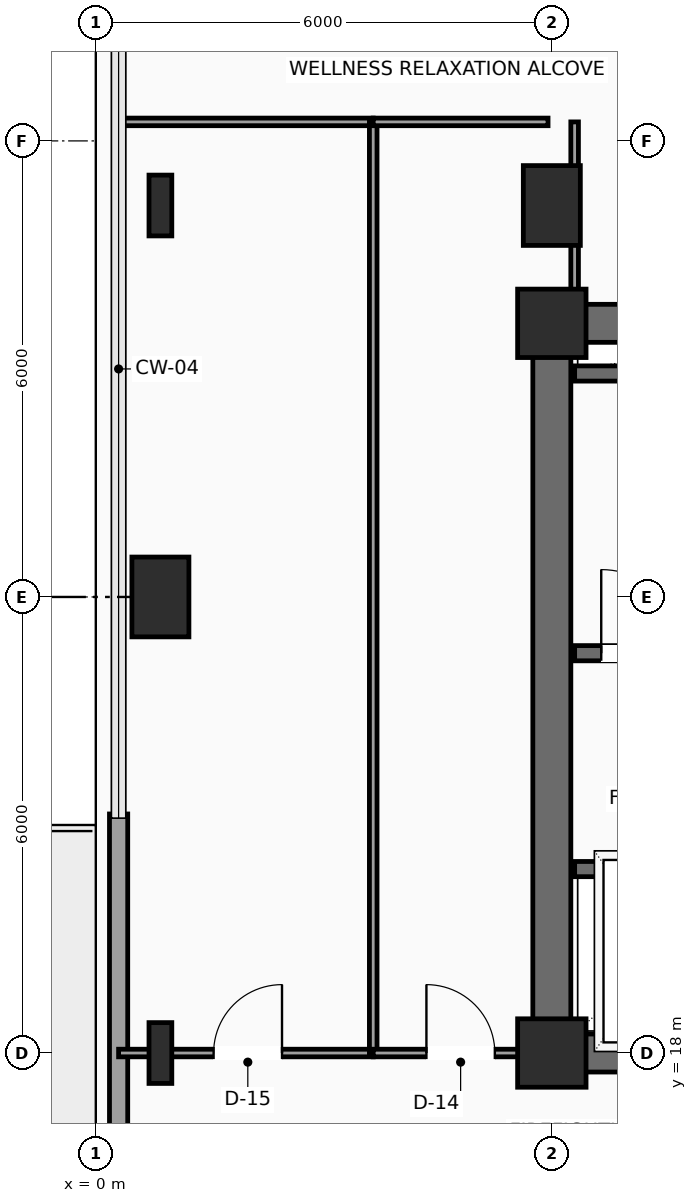
"""IFC4 building model, lengths in metres.
Left out: names, types, materials, properties, quantities, classifications, styles, units other than length and angle.
Written with IfcOpenShell. Run it as: python <this file> out.ifc"""

import sys

from ifc_helpers import new_model, si_unit, direction, frame, frame_2d, origin, origin_2d, place, context, subcontext, project, spatial, rectangle, i_section, extrude, element, fill, save


model = new_model("IFC4")
c1 = context("Model", 3, precision=1e-05, world=origin(), true_north=direction((0.0, 1.0)))
c2 = subcontext(c1, "Body", "Model", "MODEL_VIEW")
j1 = project(units=[si_unit("LENGTHUNIT", "METRE"), si_unit("PLANEANGLEUNIT", "RADIAN")], contexts=[c1])
p1 = place(None, origin())
s1 = spatial("IfcSite", under=j1, at=p1, CompositionType="ELEMENT")
p2 = place(p1, origin())
s2 = spatial("IfcBuilding", under=s1, at=p2, CompositionType="ELEMENT")
p3 = place(p2, frame((0.0, 0.0, 191.7)))
s3 = spatial("IfcBuildingStorey", under=s2, at=p3, CompositionType="ELEMENT", Elevation=191.7)
for number, where, z_axis, x_axis in (
    (1, (6.0, 18.0, 0.0), (0.0, 0.0, 1.0), (1.0, 0.0, 0.0)),
    (2, (6.0, 27.6, 0.0), (0.0, 0.0, 1.0), (1.0, 0.0, 0.0)),
):
    element("IfcColumn", number, at=place(p3, frame(where, z_axis=z_axis, x_axis=x_axis)), inside=s3, PredefinedType="COLUMN", context=c2, shape_type="SweptSolid", body=[
        extrude(rectangle(XDim=0.9, YDim=0.9, at=origin_2d()), origin(), (0.0, 0.0, 1.0), 3.75),
    ])
p4 = place(p3, frame((0.85, 18.0, 0.0), z_axis=(0.0, 0.0, 1.0), x_axis=(1.0, 0.0, 0.0)))
e3 = element("IfcColumn", 3, at=p4, inside=s3, PredefinedType="COLUMN", context=c2, shape_type="SweptSolid", body=[
    extrude(i_section(OverallWidth=0.3, OverallDepth=0.8, WebThickness=0.018, FlangeThickness=0.033, FilletRadius=0.03, at=origin_2d()), origin(), (0.0, 0.0, 1.0), 3.75),
])
p5 = place(p3, frame((0.85, 24.0, 0.0), z_axis=(0.0, 0.0, 1.0), x_axis=(1.0, 0.0, 0.0)))
e4 = element("IfcColumn", 4, at=p5, inside=s3, PredefinedType="COLUMN", context=c2, shape_type="SweptSolid", body=[
    extrude(rectangle(XDim=0.75, YDim=1.05, at=origin_2d()), origin(), (0.0, 0.0, 1.0), 3.75),
])
p6 = place(p3, frame((0.85, 29.15, 0.0), z_axis=(0.0, 0.0, 1.0), x_axis=(1.0, 0.0, 0.0)))
e5 = element("IfcColumn", 5, at=p6, inside=s3, PredefinedType="COLUMN", context=c2, shape_type="SweptSolid", body=[
    extrude(i_section(OverallWidth=0.3, OverallDepth=0.8, WebThickness=0.018, FlangeThickness=0.033, FilletRadius=0.03, at=origin_2d()), origin(), (0.0, 0.0, 1.0), 3.75),
])
p7 = place(p3, frame((6.0, 29.15, 0.0), z_axis=(0.0, 0.0, 1.0), x_axis=(1.0, 0.0, 0.0)))
e6 = element("IfcColumn", 6, at=p7, inside=s3, PredefinedType="COLUMN", context=c2, shape_type="SweptSolid", body=[
    extrude(rectangle(XDim=0.75, YDim=1.05, at=origin_2d()), origin(), (0.0, 0.0, 1.0), 3.75),
])
p8 = place(p3, frame((0.3, 11.855, 0.0), z_axis=(0.0, 0.0, 1.0), x_axis=(0.0, 1.0, 0.0)))
e7 = element("IfcWall", 7, at=p8, inside=s3, PredefinedType="SOLIDWALL", context=c2, shape_type="SweptSolid", body=[
    extrude(rectangle(XDim=9.29, YDim=0.24, at=frame_2d((4.645, 0.0))), origin(), (0.0, 0.0, 1.0), 3.54),
])
p9 = place(p8, frame((2.7, 0.0, 0.0)))
e8 = element("IfcOpeningElement", 8, at=p9, cuts=e7, PredefinedType="OPENING", context=c2, shape_type="SweptSolid", body=[
    extrude(rectangle(XDim=1.05, YDim=2.2, at=frame_2d((0.525, 1.1))), frame((0.0, 0.13, 0.0), z_axis=(0.0, -1.0, 0.0), x_axis=(1.0, 0.0, 0.0)), (0.0, 0.0, 1.0), 0.26),
])
p10 = place(p3, frame((6.0, 18.0, 0.0), z_axis=(0.0, 0.0, 1.0), x_axis=(1.0, 0.0, 0.0)))
e9 = element("IfcWall", 9, at=p10, inside=s3, PredefinedType="SHEAR", context=c2, shape_type="SweptSolid", body=[
    extrude(rectangle(XDim=12.0, YDim=0.5, at=frame_2d((6.0, 0.0))), origin(), (0.0, 0.0, 1.0), 3.54),
])
p11 = place(p10, frame((7.15, 0.0, 0.0)))
e10 = element("IfcOpeningElement", 10, at=p11, cuts=e9, PredefinedType="OPENING", context=c2, shape_type="SweptSolid", body=[
    extrude(rectangle(XDim=1.6, YDim=2.3, at=frame_2d((0.8, 1.15))), frame((0.0, 0.26, 0.0), z_axis=(0.0, -1.0, 0.0), x_axis=(1.0, 0.0, 0.0)), (0.0, 0.0, 1.0), 0.52),
])
p12 = place(p3, frame((6.0, 27.6, 0.0), z_axis=(0.0, 0.0, 1.0), x_axis=(1.0, 0.0, 0.0)))
e11 = element("IfcWall", 11, at=p12, inside=s3, PredefinedType="SHEAR", context=c2, shape_type="SweptSolid", body=[
    extrude(rectangle(XDim=12.0, YDim=0.5, at=frame_2d((6.0, 0.0))), origin(), (0.0, 0.0, 1.0), 3.54),
])
p13 = place(p12, frame((10.2, 0.0, 0.0)))
e12 = element("IfcOpeningElement", 12, at=p13, cuts=e11, PredefinedType="OPENING", context=c2, shape_type="SweptSolid", body=[
    extrude(rectangle(XDim=0.9, YDim=2.15, at=frame_2d((0.45, 1.075))), frame((0.0, 0.26, 0.0), z_axis=(0.0, -1.0, 0.0), x_axis=(1.0, 0.0, 0.0)), (0.0, 0.0, 1.0), 0.52),
])
p14 = place(p3, frame((6.0, 18.0, 0.0), z_axis=(0.0, 0.0, 1.0), x_axis=(0.0, 1.0, 0.0)))
e13 = element("IfcWall", 13, at=p14, inside=s3, PredefinedType="SHEAR", context=c2, shape_type="SweptSolid", body=[
    extrude(rectangle(XDim=9.6, YDim=0.5, at=frame_2d((4.8, 0.0))), origin(), (0.0, 0.0, 1.0), 3.54),
])
p15 = place(p3, frame((6.3, 23.26, 0.0), z_axis=(0.0, 0.0, 1.0), x_axis=(1.0, 0.0, 0.0)))
e14 = element("IfcWall", 14, at=p15, inside=s3, PredefinedType="SHEAR", context=c2, shape_type="SweptSolid", body=[
    extrude(rectangle(XDim=8.88, YDim=0.2, at=frame_2d((4.44, 0.0))), origin(), (0.0, 0.0, 1.0), 3.54),
])
p16 = place(p15, frame((0.35, 0.0, 0.0)))
e15 = element("IfcOpeningElement", 15, at=p16, cuts=e14, PredefinedType="OPENING", context=c2, shape_type="SweptSolid", body=[
    extrude(rectangle(XDim=1.1, YDim=2.2, at=frame_2d((0.55, 1.1))), frame((0.0, 0.11, 0.0), z_axis=(0.0, -1.0, 0.0), x_axis=(1.0, 0.0, 0.0)), (0.0, 0.0, 1.0), 0.22),
])
p17 = place(p3, frame((6.3, 26.94, 0.0), z_axis=(0.0, 0.0, 1.0), x_axis=(1.0, 0.0, 0.0)))
e16 = element("IfcWall", 16, at=p17, inside=s3, PredefinedType="SHEAR", context=c2, shape_type="SweptSolid", body=[
    extrude(rectangle(XDim=8.88, YDim=0.2, at=frame_2d((4.44, 0.0))), origin(), (0.0, 0.0, 1.0), 3.54),
])
p18 = place(p3, frame((6.3, 20.42, 0.0), z_axis=(0.0, 0.0, 1.0), x_axis=(1.0, 0.0, 0.0)))
e17 = element("IfcWall", 17, at=p18, inside=s3, PredefinedType="SHEAR", context=c2, shape_type="SweptSolid", body=[
    extrude(rectangle(XDim=4.95, YDim=0.2, at=frame_2d((2.475, 0.0))), origin(), (0.0, 0.0, 1.0), 3.54),
])
p19 = place(p18, frame((0.65, 0.0, 0.0)))
e18 = element("IfcOpeningElement", 18, at=p19, cuts=e17, PredefinedType="OPENING", context=c2, shape_type="SweptSolid", body=[
    extrude(rectangle(XDim=1.1, YDim=2.2, at=frame_2d((0.55, 1.1))), frame((0.0, 0.11, 0.0), z_axis=(0.0, -1.0, 0.0), x_axis=(1.0, 0.0, 0.0)), (0.0, 0.0, 1.0), 0.22),
])
p20 = place(p18, frame((3.05, 0.0, 0.0)))
e19 = element("IfcOpeningElement", 19, at=p20, cuts=e17, PredefinedType="OPENING", context=c2, shape_type="SweptSolid", body=[
    extrude(rectangle(XDim=1.1, YDim=2.2, at=frame_2d((0.55, 1.1))), frame((0.0, 0.11, 0.0), z_axis=(0.0, -1.0, 0.0), x_axis=(1.0, 0.0, 0.0)), (0.0, 0.0, 1.0), 0.22),
])
p21 = place(p3, frame((0.3, 18.0, 0.0), z_axis=(0.0, 0.0, 1.0), x_axis=(1.0, 0.0, 0.0)))
e20 = element("IfcWall", 20, at=p21, inside=s3, PredefinedType="PARTITIONING", context=c2, shape_type="SweptSolid", body=[
    extrude(rectangle(XDim=3.35, YDim=0.1, at=frame_2d((1.675, 0.0))), origin(), (0.0, 0.0, 1.0), 3.132),
])
p22 = place(p21, frame((1.25, 0.0, 0.0)))
e21 = element("IfcOpeningElement", 21, at=p22, cuts=e20, PredefinedType="OPENING", context=c2, shape_type="SweptSolid", body=[
    extrude(rectangle(XDim=0.9, YDim=2.1, at=frame_2d((0.45, 1.05))), frame((0.0, 0.06, 0.0), z_axis=(0.0, -1.0, 0.0), x_axis=(1.0, 0.0, 0.0)), (0.0, 0.0, 1.0), 0.12),
])
p23 = place(p3, frame((0.3, 30.25, 0.0), z_axis=(0.0, 0.0, 1.0), x_axis=(1.0, 0.0, 0.0)))
e22 = element("IfcWall", 22, at=p23, inside=s3, PredefinedType="PARTITIONING", context=c2, shape_type="SweptSolid", body=[
    extrude(rectangle(XDim=3.35, YDim=0.1, at=frame_2d((1.675, 0.0))), origin(), (0.0, 0.0, 1.0), 3.54),
])
p24 = place(p3, frame((3.65, 18.0, 0.0), z_axis=(0.0, 0.0, 1.0), x_axis=(0.0, 1.0, 0.0)))
e23 = element("IfcWall", 23, at=p24, inside=s3, PredefinedType="PARTITIONING", context=c2, shape_type="SweptSolid", body=[
    extrude(rectangle(XDim=12.25, YDim=0.1, at=frame_2d((6.125, 0.0))), origin(), (0.0, 0.0, 1.0), 3.54),
])
p25 = place(p3, frame((3.65, 18.0, 0.0), z_axis=(0.0, 0.0, 1.0), x_axis=(1.0, 0.0, 0.0)))
e24 = element("IfcWall", 24, at=p25, inside=s3, PredefinedType="PARTITIONING", context=c2, shape_type="SweptSolid", body=[
    extrude(rectangle(XDim=2.3, YDim=0.1, at=frame_2d((1.15, 0.0))), origin(), (0.0, 0.0, 1.0), 3.132),
])
p26 = place(p25, frame((0.7, 0.0, 0.0)))
e25 = element("IfcOpeningElement", 25, at=p26, cuts=e24, PredefinedType="OPENING", context=c2, shape_type="SweptSolid", body=[
    extrude(rectangle(XDim=0.9, YDim=2.1, at=frame_2d((0.45, 1.05))), frame((0.0, 0.06, 0.0), z_axis=(0.0, -1.0, 0.0), x_axis=(1.0, 0.0, 0.0)), (0.0, 0.0, 1.0), 0.12),
])
p27 = place(p3, frame((3.65, 30.25, 0.0), z_axis=(0.0, 0.0, 1.0), x_axis=(1.0, 0.0, 0.0)))
e26 = element("IfcWall", 26, at=p27, inside=s3, PredefinedType="PARTITIONING", context=c2, shape_type="SweptSolid", body=[
    extrude(rectangle(XDim=2.3, YDim=0.1, at=frame_2d((1.15, 0.0))), origin(), (0.0, 0.0, 1.0), 3.54),
])
p28 = place(p3, frame((6.3, 27.65, 0.0), z_axis=(0.0, 0.0, 1.0), x_axis=(0.0, 1.0, 0.0)))
e27 = element("IfcWall", 27, at=p28, inside=s3, PredefinedType="PARTITIONING", context=c2, shape_type="SweptSolid", body=[
    extrude(rectangle(XDim=2.6, YDim=0.1, at=frame_2d((1.3, 0.0))), origin(), (0.0, 0.0, 1.0), 3.54),
])
p29 = place(p16, origin())
e28 = element("IfcDoor", 28, at=p29, inside=s3, OperationType="SINGLE_SWING_LEFT", PredefinedType="DOOR", context=c2, shape_type="SweptSolid", body=[
    extrude(rectangle(XDim=1.1, YDim=2.2, at=frame_2d((0.55, 1.1))), frame((0.0, 0.025, 0.0), z_axis=(0.0, -1.0, 0.0), x_axis=(1.0, 0.0, 0.0)), (0.0, 0.0, 1.0), 0.05),
])
fill(e15, e28)
p30 = place(p22, origin())
e29 = element("IfcDoor", 29, at=p30, inside=s3, OperationType="SINGLE_SWING_RIGHT", PredefinedType="DOOR", context=c2, shape_type="SweptSolid", body=[
    extrude(rectangle(XDim=0.9, YDim=2.1, at=frame_2d((0.45, 1.05))), frame((0.0, 0.025, 0.0), z_axis=(0.0, -1.0, 0.0), x_axis=(1.0, 0.0, 0.0)), (0.0, 0.0, 1.0), 0.05),
])
fill(e21, e29)
p31 = place(p26, origin())
e30 = element("IfcDoor", 30, at=p31, inside=s3, OperationType="SINGLE_SWING_LEFT", PredefinedType="DOOR", context=c2, shape_type="SweptSolid", body=[
    extrude(rectangle(XDim=0.9, YDim=2.1, at=frame_2d((0.45, 1.05))), frame((0.0, 0.025, 0.0), z_axis=(0.0, -1.0, 0.0), x_axis=(1.0, 0.0, 0.0)), (0.0, 0.0, 1.0), 0.05),
])
fill(e25, e30)
save(model, sys.argv[1])
